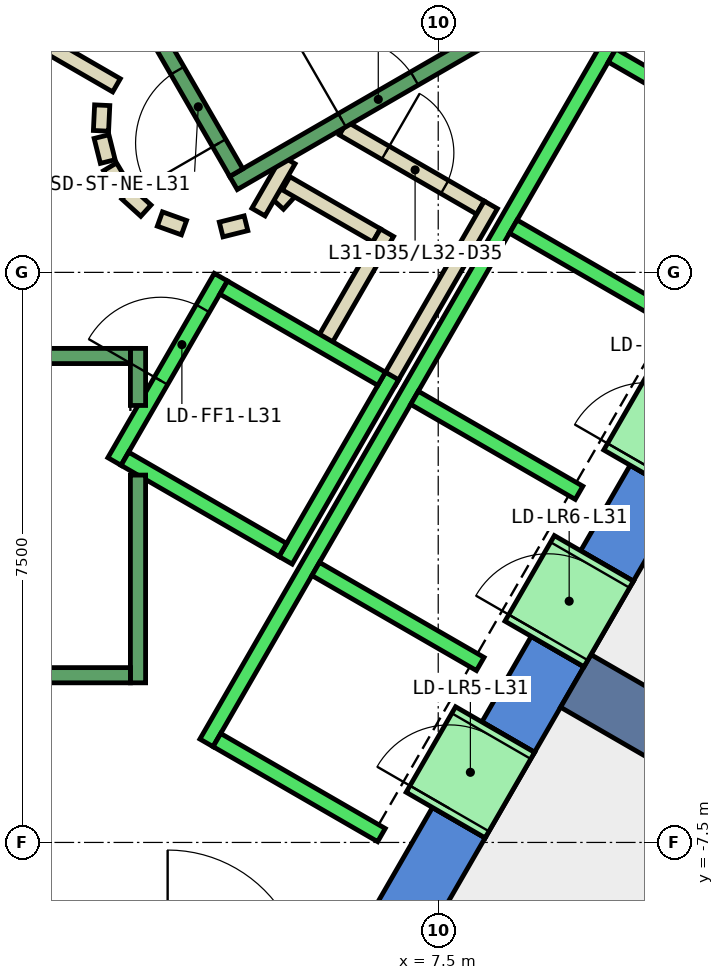
"""IFC4 building model, lengths in metres.
Left out: names, types, materials, properties, quantities, classifications, styles, units other than length and angle.
Written with IfcOpenShell. Run it as: python <this file> out.ifc"""

import sys

from ifc_helpers import new_model, si_unit, direction, frame, frame_2d, origin, place, context, subcontext, project, spatial, polyline, rectangle, outline, extrude, element, fill, save


model = new_model("IFC4")
c1 = context("Model", 3, precision=1e-05, world=origin(), true_north=direction((0.0, 1.0)))
c2 = subcontext(c1, "Body", "Model", "MODEL_VIEW")
j1 = project(units=[si_unit("LENGTHUNIT", "METRE"), si_unit("PLANEANGLEUNIT", "RADIAN")], contexts=[c1])
p1 = place(None, origin())
s1 = spatial("IfcSite", under=j1, at=p1, CompositionType="ELEMENT")
p2 = place(p1, origin())
s2 = spatial("IfcBuilding", under=s1, at=p2, CompositionType="ELEMENT")
p3 = place(p2, frame((0.0, 0.0, 142.4)))
s3 = spatial("IfcBuildingStorey", under=s2, at=p3, CompositionType="ELEMENT", Elevation=142.4)
p4 = place(p3, frame((0.0, 0.0, -0.4)))
e1 = element("IfcWall", 1, at=p4, inside=s3, PredefinedType="SHEAR", context=c2, shape_type="SweptSolid", body=[
    extrude(outline(polyline([(8.517, 11.748), (7.824, 11.348), (12.933, 2.5), (13.856, 2.5), (8.517, 11.748)])), origin(), (0.0, 0.0, 1.0), 4.2),
])
p5 = place(p3, frame((0.0, 0.0, -0.4)))
e2 = element("IfcWall", 2, at=p5, inside=s3, PredefinedType="SHEAR", context=c2, shape_type="SweptSolid", body=[
    extrude(outline(polyline([(8.117, -7.44), (7.424, -7.04), (6.466, -8.7), (6.928, -9.5), (8.117, -7.44)])), origin(), (0.0, 0.0, 1.0), 4.2),
])
p6 = place(p3, frame((0.0, 0.0, -0.4)))
e3 = element("IfcWall", 3, at=p6, inside=s3, PredefinedType="SHEAR", context=c2, shape_type="SweptSolid", body=[
    extrude(outline(polyline([(9.417, -5.189), (8.724, -4.789), (8.075, -5.914), (8.767, -6.314), (9.417, -5.189)])), origin(), (0.0, 0.0, 1.0), 4.2),
])
p7 = place(p3, frame((0.0, 0.0, -0.4)))
e4 = element("IfcWall", 4, at=p7, inside=s3, PredefinedType="SHEAR", context=c2, shape_type="SweptSolid", body=[
    extrude(outline(polyline([(10.717, -2.937), (10.025, -2.537), (9.374, -3.663), (10.067, -4.063), (10.717, -2.937)])), origin(), (0.0, 0.0, 1.0), 4.2),
])
p8 = place(p3, frame((0.0, 0.0, 3.6)))
e5 = element("IfcWall", 5, at=p8, inside=s3, PredefinedType="SHEAR", context=c2, shape_type="SweptSolid", body=[
    extrude(outline(polyline([(8.767, -6.314), (8.075, -5.914), (7.424, -7.04), (8.117, -7.44), (8.767, -6.314)])), origin(), (0.0, 0.0, 1.0), 0.2),
])
p9 = place(p3, frame((0.0, 0.0, 3.6)))
e6 = element("IfcWall", 6, at=p9, inside=s3, PredefinedType="SHEAR", context=c2, shape_type="SweptSolid", body=[
    extrude(outline(polyline([(10.067, -4.063), (9.374, -3.663), (8.724, -4.789), (9.417, -5.189), (10.067, -4.063)])), origin(), (0.0, 0.0, 1.0), 0.2),
])
p10 = place(p3, frame((0.0, 0.0, 3.6)))
e7 = element("IfcWall", 7, at=p10, inside=s3, PredefinedType="SHEAR", context=c2, shape_type="SweptSolid", body=[
    extrude(outline(polyline([(11.367, -1.811), (10.675, -1.411), (10.025, -2.537), (10.717, -2.937), (11.367, -1.811)])), origin(), (0.0, 0.0, 1.0), 0.2),
])
p11 = place(p3, frame((9.31, -5.375, -0.4), z_axis=(0.0, 0.0, 1.0), x_axis=(0.866017533419, -0.500013631625, 0.0)))
e8 = element("IfcWall", 8, at=p11, inside=s3, PredefinedType="SHEAR", context=c2, shape_type="SweptSolid", body=[
    extrude(rectangle(XDim=9.0, YDim=0.8, at=frame_2d((4.5, 0.0))), origin(), (0.0, 0.0, 1.0), 4.2),
])
p12 = place(p3, frame((5.39, 0.898, 0.0), z_axis=(0.0, 0.0, 1.0), x_axis=(0.673828488714, 0.738887791073, 0.0)))
e9 = element("IfcWall", 9, at=p12, inside=s3, PredefinedType="PARTITIONING", context=c2, shape_type="SweptSolid", body=[
    extrude(rectangle(XDim=0.263, YDim=0.2, at=frame_2d((0.131, 0.0))), origin(), (0.0, 0.0, 1.0), 3.8),
])
p13 = place(p3, frame((5.499, 1.172, 0.0), z_axis=(0.0, 0.0, 1.0), x_axis=(0.866333505267, -0.499465972466, 0.0)))
e10 = element("IfcWall", 10, at=p13, inside=s3, PredefinedType="PARTITIONING", context=c2, shape_type="SweptSolid", body=[
    extrude(rectangle(XDim=1.374, YDim=0.2, at=frame_2d((0.687, 0.0))), origin(), (0.0, 0.0, 1.0), 3.8),
])
p14 = place(p3, frame((6.826, 0.522, 0.0), z_axis=(0.0, 0.0, 1.0), x_axis=(-0.500016722714, -0.866015748706, 0.0)))
e11 = element("IfcWall", 11, at=p14, inside=s3, PredefinedType="PARTITIONING", context=c2, shape_type="SweptSolid", body=[
    extrude(rectangle(XDim=1.7, YDim=0.2, at=frame_2d((0.85, 0.0))), origin(), (0.0, 0.0, 1.0), 3.8),
])
p15 = place(p3, frame((6.25, 1.894, 0.0), z_axis=(0.0, 0.0, 1.0), x_axis=(0.866043184279, -0.499969202016, 0.0)))
e12 = element("IfcWall", 12, at=p15, inside=s3, PredefinedType="PARTITIONING", context=c2, shape_type="SweptSolid", body=[
    extrude(rectangle(XDim=2.084, YDim=0.2, at=frame_2d((1.042, 0.0))), origin(), (0.0, 0.0, 1.0), 3.8),
])
p16 = place(p15, frame((0.642, 0.0, 0.0)))
e13 = element("IfcOpeningElement", 13, at=p16, cuts=e12, PredefinedType="OPENING", context=c2, shape_type="SweptSolid", body=[
    extrude(rectangle(XDim=0.9, YDim=2.1, at=frame_2d((0.45, 1.05))), frame((0.0, 0.11, 0.0), z_axis=(0.0, -1.0, 0.0), x_axis=(1.0, 0.0, 0.0)), (0.0, 0.0, 1.0), 0.22),
])
p17 = place(p3, frame((8.192, 0.888, 0.0), z_axis=(0.0, 0.0, 1.0), x_axis=(-0.499940625693, -0.866059680843, 0.0)))
e14 = element("IfcWall", 14, at=p17, inside=s3, PredefinedType="PARTITIONING", context=c2, shape_type="SweptSolid", body=[
    extrude(rectangle(XDim=2.68, YDim=0.2, at=frame_2d((1.34, 0.0))), origin(), (0.0, 0.0, 1.0), 3.8),
])
p18 = place(p3, frame((5.135, 0.793, 0.0), z_axis=(0.0, 0.0, 1.0), x_axis=(0.499526442893, 0.866298639529, 0.0)))
e15 = element("IfcWall", 15, at=p18, inside=s3, PredefinedType="PARTITIONING", context=c2, shape_type="SweptSolid", body=[
    extrude(rectangle(XDim=0.791, YDim=0.2, at=frame_2d((0.396, 0.0))), origin(), (0.0, 0.0, 1.0), 3.8),
])
p19 = place(p3, frame((2.012, 3.186, 0.0), z_axis=(0.0, 0.0, 1.0), x_axis=(0.865891012941, -0.500232699559, 0.0)))
e16 = element("IfcWall", 16, at=p19, inside=s3, PredefinedType="PARTITIONING", context=c2, shape_type="SweptSolid", body=[
    extrude(rectangle(XDim=1.449, YDim=0.2, at=frame_2d((0.725, 0.0))), origin(), (0.0, 0.0, 1.0), 3.8),
])
p20 = place(p3, frame((3.079, 2.199, 0.0), z_axis=(0.0, 0.0, 1.0), x_axis=(-0.047771483479, -0.998858290933, 0.0)))
e17 = element("IfcWall", 17, at=p20, inside=s3, PredefinedType="PARTITIONING", context=c2, shape_type="SweptSolid", body=[
    extrude(rectangle(XDim=0.337, YDim=0.2, at=frame_2d((0.169, 0.0))), origin(), (0.0, 0.0, 1.0), 3.8),
])
p21 = place(p3, frame((3.07, 1.786, 0.0), z_axis=(0.0, 0.0, 1.0), x_axis=(0.242705583207, -0.970099994784, 0.0)))
e18 = element("IfcWall", 18, at=p21, inside=s3, PredefinedType="PARTITIONING", context=c2, shape_type="SweptSolid", body=[
    extrude(rectangle(XDim=0.338, YDim=0.2, at=frame_2d((0.169, 0.0))), origin(), (0.0, 0.0, 1.0), 3.8),
])
for number, where, z_axis, x_axis in (
    (19, (3.182, 1.388, 0.0), (0.0, 0.0, 1.0), (0.512, -0.859, 0.0)),
    (20, (3.404, 1.039, 0.0), (0.0, 0.0, 1.0), (0.74, -0.672, 0.0)),
):
    element("IfcWall", number, at=place(p3, frame(where, z_axis=z_axis, x_axis=x_axis)), inside=s3, PredefinedType="PARTITIONING", context=c2, shape_type="SweptSolid", body=[
        extrude(rectangle(XDim=0.338, YDim=0.2, at=frame_2d((0.169, 0.0))), origin(), (0.0, 0.0, 1.0), 3.8),
    ])
p22 = place(p3, frame((3.838, 0.702, 0.0), z_axis=(0.0, 0.0, 1.0), x_axis=(0.941035081519, -0.338308993895, 0.0)))
e21 = element("IfcWall", 21, at=p22, inside=s3, PredefinedType="PARTITIONING", context=c2, shape_type="SweptSolid", body=[
    extrude(rectangle(XDim=0.337, YDim=0.2, at=frame_2d((0.168, 0.0))), origin(), (0.0, 0.0, 1.0), 3.8),
])
p23 = place(p3, frame((4.644, 0.564, 0.0), z_axis=(0.0, 0.0, 1.0), x_axis=(0.969929076366, 0.243387729394, 0.0)))
e22 = element("IfcWall", 22, at=p23, inside=s3, PredefinedType="PARTITIONING", context=c2, shape_type="SweptSolid", body=[
    extrude(rectangle(XDim=0.337, YDim=0.2, at=frame_2d((0.168, 0.0))), origin(), (0.0, 0.0, 1.0), 3.8),
])
p24 = place(p3, frame((12.401, -7.621, 0.0), z_axis=(0.0, 0.0, 1.0), x_axis=(-0.499964151829, -0.866046099747, 0.0)))
e23 = element("IfcWall", 23, at=p24, inside=s3, PredefinedType="PARTITIONING", context=c2, shape_type="SweptSolid", body=[
    extrude(rectangle(XDim=8.656, YDim=0.2, at=frame_2d((4.328, 0.0))), origin(), (0.0, 0.0, 1.0), 3.8),
])
p25 = place(p24, frame((2.694, 0.0, 0.0)))
e24 = element("IfcOpeningElement", 24, at=p25, cuts=e23, PredefinedType="OPENING", context=c2, shape_type="SweptSolid", body=[
    extrude(rectangle(XDim=1.0, YDim=2.1, at=frame_2d((0.5, 1.05))), frame((0.0, 0.11, 0.0), z_axis=(0.0, -1.0, 0.0), x_axis=(1.0, 0.0, 0.0)), (0.0, 0.0, 1.0), 0.22),
])
p26 = place(p24, frame((3.794, 0.0, 0.0)))
e25 = element("IfcOpeningElement", 25, at=p26, cuts=e23, PredefinedType="OPENING", context=c2, shape_type="SweptSolid", body=[
    extrude(rectangle(XDim=1.0, YDim=2.1, at=frame_2d((0.5, 1.05))), frame((0.0, 0.11, 0.0), z_axis=(0.0, -1.0, 0.0), x_axis=(1.0, 0.0, 0.0)), (0.0, 0.0, 1.0), 0.22),
])
p27 = place(p3, frame((3.24, -2.488, 0.0), z_axis=(0.0, 0.0, 1.0), x_axis=(0.49994636267, 0.866056369097, 0.0)))
e26 = element("IfcWall", 26, at=p27, inside=s3, PredefinedType="STANDARD", context=c2, shape_type="SweptSolid", body=[
    extrude(rectangle(XDim=2.8, YDim=0.2, at=frame_2d((1.4, 0.0))), origin(), (0.0, 0.0, 1.0), 3.8),
])
p28 = place(p27, frame((1.225, 0.0, 0.0)))
e27 = element("IfcOpeningElement", 27, at=p28, cuts=e26, PredefinedType="OPENING", context=c2, shape_type="SweptSolid", body=[
    extrude(rectangle(XDim=1.1, YDim=2.1, at=frame_2d((0.55, 1.05))), frame((0.0, 0.11, 0.0), z_axis=(0.0, -1.0, 0.0), x_axis=(1.0, 0.0, 0.0)), (0.0, 0.0, 1.0), 0.22),
])
p29 = place(p3, frame((5.492, -3.788, 0.0), z_axis=(0.0, 0.0, 1.0), x_axis=(0.500011755427, 0.866018616679, 0.0)))
e28 = element("IfcWall", 28, at=p29, inside=s3, PredefinedType="STANDARD", context=c2, shape_type="SweptSolid", body=[
    extrude(rectangle(XDim=2.8, YDim=0.2, at=frame_2d((1.4, 0.0))), origin(), (0.0, 0.0, 1.0), 3.8),
])
p30 = place(p3, frame((3.377, -2.452, 0.0), z_axis=(0.0, 0.0, 1.0), x_axis=(0.865955154139, -0.50012165622, 0.0)))
e29 = element("IfcWall", 29, at=p30, inside=s3, PredefinedType="STANDARD", context=c2, shape_type="SweptSolid", body=[
    extrude(rectangle(XDim=2.4, YDim=0.2, at=frame_2d((1.2, 0.0))), origin(), (0.0, 0.0, 1.0), 3.8),
])
p31 = place(p3, frame((4.677, -0.2, 0.0), z_axis=(0.0, 0.0, 1.0), x_axis=(0.865973769406, -0.500089422704, 0.0)))
e30 = element("IfcWall", 30, at=p31, inside=s3, PredefinedType="STANDARD", context=c2, shape_type="SweptSolid", body=[
    extrude(rectangle(XDim=2.399, YDim=0.2, at=frame_2d((1.2, 0.0))), origin(), (0.0, 0.0, 1.0), 3.8),
])
p32 = place(p3, frame((4.451, -6.19, 0.0), z_axis=(0.0, 0.0, 1.0), x_axis=(0.50000090737, 0.866024879913, 0.0)))
e31 = element("IfcWall", 31, at=p32, inside=s3, PredefinedType="STANDARD", context=c2, shape_type="SweptSolid", body=[
    extrude(rectangle(XDim=10.6, YDim=0.2, at=frame_2d((5.3, 0.0))), origin(), (0.0, 0.0, 1.0), 3.8),
])
for number, where, z_axis, x_axis in (
    (32, (4.588, -6.153, 0.0), (0.0, 0.0, 1.0), (0.866, -0.5, 0.0)),
    (33, (5.888, -3.902, 0.0), (0.0, 0.0, 1.0), (0.866, -0.5, 0.0)),
    (34, (7.188, -1.65, 0.0), (0.0, 0.0, 1.0), (0.866, -0.5, 0.0)),
    (35, (8.488, 0.602, 0.0), (0.0, 0.0, 1.0), (0.866, -0.5, 0.0)),
):
    element("IfcWall", number, at=place(p3, frame(where, z_axis=z_axis, x_axis=x_axis)), inside=s3, PredefinedType="STANDARD", context=c2, shape_type="SweptSolid", body=[
        extrude(rectangle(XDim=2.5, YDim=0.2, at=frame_2d((1.25, 0.0))), origin(), (0.0, 0.0, 1.0), 3.8),
    ])
p33 = place(p3, frame((9.788, 2.853, 0.0), z_axis=(0.0, 0.0, 1.0), x_axis=(0.865998541277, -0.500046524342, 0.0)))
e36 = element("IfcWall", 36, at=p33, inside=s3, PredefinedType="STANDARD", context=c2, shape_type="SweptSolid", body=[
    extrude(rectangle(XDim=2.5, YDim=0.2, at=frame_2d((1.25, 0.0))), origin(), (0.0, 0.0, 1.0), 3.8),
])
p34 = place(p3, frame((7.598, -7.14, 0.0), z_axis=(0.0, 0.0, 1.0), x_axis=(0.500362116554, 0.865816234728, 0.0)))
e37 = element("IfcWall", 37, at=p34, inside=s3, PredefinedType="STANDARD", context=c2, shape_type="SweptSolid", body=[
    extrude(rectangle(XDim=1.299, YDim=1.2, at=frame_2d((0.65, 0.0))), origin(), (0.0, 0.0, 1.0), 2.4),
])
p35 = place(p34, frame((0.1, 0.0, 0.0)))
e38 = element("IfcOpeningElement", 38, at=p35, cuts=e37, PredefinedType="OPENING", context=c2, shape_type="SweptSolid", body=[
    extrude(rectangle(XDim=1.1, YDim=2.3, at=frame_2d((0.55, 1.15))), frame((0.0, 0.61, 0.0), z_axis=(0.0, -1.0, 0.0), x_axis=(1.0, 0.0, 0.0)), (0.0, 0.0, 1.0), 1.22),
])
p36 = place(p3, frame((8.898, -4.889, 0.0), z_axis=(0.0, 0.0, 1.0), x_axis=(0.500036693733, 0.866004217611, 0.0)))
e39 = element("IfcWall", 39, at=p36, inside=s3, PredefinedType="STANDARD", context=c2, shape_type="SweptSolid", body=[
    extrude(rectangle(XDim=1.3, YDim=1.2, at=frame_2d((0.65, 0.0))), origin(), (0.0, 0.0, 1.0), 2.4),
])
p37 = place(p36, frame((0.1, 0.0, 0.0)))
e40 = element("IfcOpeningElement", 40, at=p37, cuts=e39, PredefinedType="OPENING", context=c2, shape_type="SweptSolid", body=[
    extrude(rectangle(XDim=1.1, YDim=2.3, at=frame_2d((0.55, 1.15))), frame((0.0, 0.61, 0.0), z_axis=(0.0, -1.0, 0.0), x_axis=(1.0, 0.0, 0.0)), (0.0, 0.0, 1.0), 1.22),
])
p38 = place(p3, frame((10.198, -2.637, 0.0), z_axis=(0.0, 0.0, 1.0), x_axis=(0.49989585183, 0.866085525409, 0.0)))
e41 = element("IfcWall", 41, at=p38, inside=s3, PredefinedType="STANDARD", context=c2, shape_type="SweptSolid", body=[
    extrude(rectangle(XDim=1.3, YDim=1.2, at=frame_2d((0.65, 0.0))), origin(), (0.0, 0.0, 1.0), 2.4),
])
p39 = place(p38, frame((0.1, 0.0, 0.0)))
e42 = element("IfcOpeningElement", 42, at=p39, cuts=e41, PredefinedType="OPENING", context=c2, shape_type="SweptSolid", body=[
    extrude(rectangle(XDim=1.1, YDim=2.3, at=frame_2d((0.55, 1.15))), frame((0.0, 0.61, 0.0), z_axis=(0.0, -1.0, 0.0), x_axis=(1.0, 0.0, 0.0)), (0.0, 0.0, 1.0), 1.22),
])
p40 = place(p3, frame((3.55, -2.667, 0.0), z_axis=(0.0, 0.0, 1.0), x_axis=(0.0, -1.0, 0.0)))
e43 = element("IfcWall", 43, at=p40, inside=s3, PredefinedType="STANDARD", context=c2, shape_type="SweptSolid", body=[
    extrude(rectangle(XDim=2.733, YDim=0.2, at=frame_2d((1.366, 0.0))), origin(), (0.0, 0.0, 1.0), 3.8),
])
p41 = place(p3, frame((3.55, -1.0, 0.0), z_axis=(0.0, 0.0, 1.0), x_axis=(0.0, -1.0, 0.0)))
e44 = element("IfcWall", 44, at=p41, inside=s3, PredefinedType="STANDARD", context=c2, shape_type="SweptSolid", body=[
    extrude(rectangle(XDim=0.751, YDim=0.2, at=frame_2d((0.375, 0.0))), origin(), (0.0, 0.0, 1.0), 3.8),
])
p42 = place(p3, frame((-3.45, -1.1, 0.0), z_axis=(0.0, 0.0, 1.0), x_axis=(1.0, 0.0, 0.0)))
e45 = element("IfcWall", 45, at=p42, inside=s3, PredefinedType="STANDARD", context=c2, shape_type="SweptSolid", body=[
    extrude(rectangle(XDim=6.9, YDim=0.2, at=frame_2d((3.45, 0.0))), origin(), (0.0, 0.0, 1.0), 3.8),
])
p43 = place(p42, frame((0.45, 0.0, 0.0)))
e46 = element("IfcOpeningElement", 46, at=p43, cuts=e45, PredefinedType="OPENING", context=c2, shape_type="SweptSolid", body=[
    extrude(rectangle(XDim=1.1, YDim=2.2, at=frame_2d((0.55, 1.1))), frame((0.0, 0.11, 0.0), z_axis=(0.0, -1.0, 0.0), x_axis=(1.0, 0.0, 0.0)), (0.0, 0.0, 1.0), 0.22),
])
p44 = place(p3, frame((-3.45, -5.3, 0.0), z_axis=(0.0, 0.0, 1.0), x_axis=(1.0, 0.0, 0.0)))
e47 = element("IfcWall", 47, at=p44, inside=s3, PredefinedType="STANDARD", context=c2, shape_type="SweptSolid", body=[
    extrude(rectangle(XDim=6.9, YDim=0.2, at=frame_2d((3.45, 0.0))), origin(), (0.0, 0.0, 1.0), 3.8),
])
p45 = place(p3, frame((4.806, 1.176, 0.0), z_axis=(0.0, 0.0, 1.0), x_axis=(0.866059941101, 0.499940174841, 0.0)))
e48 = element("IfcWall", 48, at=p45, inside=s3, PredefinedType="STANDARD", context=c2, shape_type="SweptSolid", body=[
    extrude(rectangle(XDim=4.4, YDim=0.2, at=frame_2d((2.2, 0.0))), origin(), (0.0, 0.0, 1.0), 3.8),
])
p46 = place(p45, frame((1.65, 0.0, 0.0)))
e49 = element("IfcOpeningElement", 49, at=p46, cuts=e48, PredefinedType="OPENING", context=c2, shape_type="SweptSolid", body=[
    extrude(rectangle(XDim=1.1, YDim=2.2, at=frame_2d((0.55, 1.1))), frame((0.0, 0.11, 0.0), z_axis=(0.0, -1.0, 0.0), x_axis=(1.0, 0.0, 0.0)), (0.0, 0.0, 1.0), 0.22),
])
p47 = place(p3, frame((4.843, 1.312, 0.0), z_axis=(0.0, 0.0, 1.0), x_axis=(-0.499963383562, 0.866046543262, 0.0)))
e50 = element("IfcWall", 50, at=p47, inside=s3, PredefinedType="STANDARD", context=c2, shape_type="SweptSolid", body=[
    extrude(rectangle(XDim=6.9, YDim=0.2, at=frame_2d((3.45, 0.0))), origin(), (0.0, 0.0, 1.0), 3.8),
])
p48 = place(p47, frame((0.45, 0.0, 0.0)))
e51 = element("IfcOpeningElement", 51, at=p48, cuts=e50, PredefinedType="OPENING", context=c2, shape_type="SweptSolid", body=[
    extrude(rectangle(XDim=1.1, YDim=2.2, at=frame_2d((0.55, 1.1))), frame((0.0, 0.11, 0.0), z_axis=(0.0, -1.0, 0.0), x_axis=(1.0, 0.0, 0.0)), (0.0, 0.0, 1.0), 0.22),
])
p49 = place(p16, origin())
e52 = element("IfcDoor", 52, at=p49, inside=s3, OperationType="SINGLE_SWING_LEFT", PredefinedType="DOOR", context=c2, shape_type="SweptSolid", body=[
    extrude(rectangle(XDim=0.9, YDim=2.1, at=frame_2d((0.45, 1.05))), frame((0.0, 0.025, 0.0), z_axis=(0.0, -1.0, 0.0), x_axis=(1.0, 0.0, 0.0)), (0.0, 0.0, 1.0), 0.05),
])
fill(e13, e52)
p50 = place(p35, origin())
e53 = element("IfcDoor", 53, at=p50, inside=s3, OperationType="SLIDING_TO_LEFT", PredefinedType="DOOR", context=c2, shape_type="SweptSolid", body=[
    extrude(rectangle(XDim=1.1, YDim=2.3, at=frame_2d((0.55, 1.15))), frame((0.0, 0.025, 0.0), z_axis=(0.0, -1.0, 0.0), x_axis=(1.0, 0.0, 0.0)), (0.0, 0.0, 1.0), 0.05),
])
fill(e38, e53)
p51 = place(p37, origin())
e54 = element("IfcDoor", 54, at=p51, inside=s3, OperationType="SLIDING_TO_LEFT", PredefinedType="DOOR", context=c2, shape_type="SweptSolid", body=[
    extrude(rectangle(XDim=1.1, YDim=2.3, at=frame_2d((0.55, 1.15))), frame((0.0, 0.025, 0.0), z_axis=(0.0, -1.0, 0.0), x_axis=(1.0, 0.0, 0.0)), (0.0, 0.0, 1.0), 0.05),
])
fill(e40, e54)
p52 = place(p28, origin())
e55 = element("IfcDoor", 55, at=p52, inside=s3, OperationType="SLIDING_TO_LEFT", PredefinedType="DOOR", context=c2, shape_type="SweptSolid", body=[
    extrude(rectangle(XDim=1.1, YDim=2.1, at=frame_2d((0.55, 1.05))), frame((0.0, 0.025, 0.0), z_axis=(0.0, -1.0, 0.0), x_axis=(1.0, 0.0, 0.0)), (0.0, 0.0, 1.0), 0.05),
])
fill(e27, e55)
p53 = place(p48, origin())
e56 = element("IfcDoor", 56, at=p53, inside=s3, OperationType="SINGLE_SWING_LEFT", PredefinedType="DOOR", context=c2, shape_type="SweptSolid", body=[
    extrude(rectangle(XDim=1.1, YDim=2.2, at=frame_2d((0.55, 1.1))), frame((0.0, 0.025, 0.0), z_axis=(0.0, -1.0, 0.0), x_axis=(1.0, 0.0, 0.0)), (0.0, 0.0, 1.0), 0.05),
])
fill(e51, e56)
p54 = place(p46, origin())
e57 = element("IfcDoor", 57, at=p54, inside=s3, OperationType="SINGLE_SWING_LEFT", PredefinedType="DOOR", context=c2, shape_type="SweptSolid", body=[
    extrude(rectangle(XDim=1.1, YDim=2.2, at=frame_2d((0.55, 1.1))), frame((0.0, 0.025, 0.0), z_axis=(0.0, -1.0, 0.0), x_axis=(1.0, 0.0, 0.0)), (0.0, 0.0, 1.0), 0.05),
])
fill(e49, e57)
save(model, sys.argv[1])
